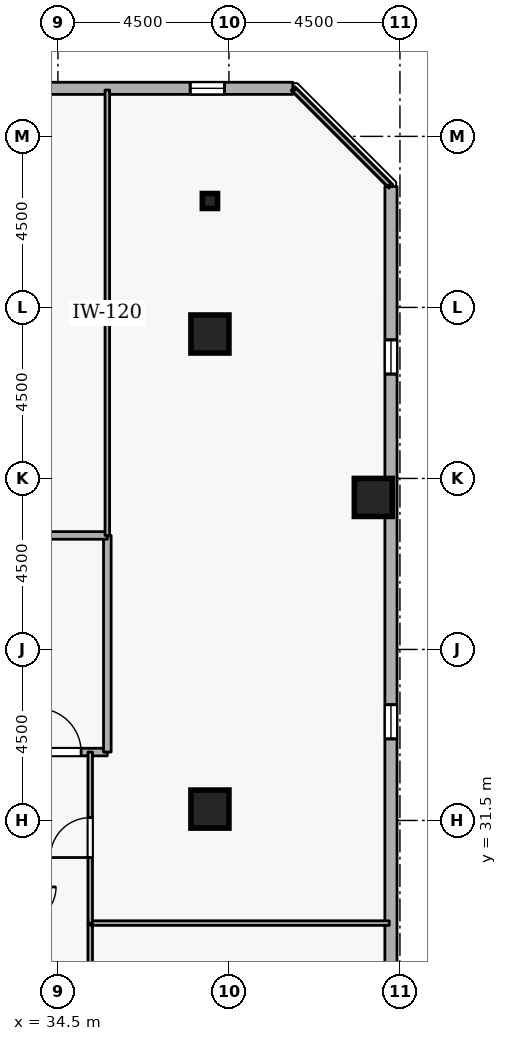
"""IFC4 building model, lengths in metres.
Left out: names, types, materials, properties, quantities, classifications, styles, units other than length and angle.
Written with IfcOpenShell. Run it as: python <this file> out.ifc"""

import sys

from ifc_helpers import new_model, si_unit, direction, frame, frame_2d, origin, origin_2d, place, context, subcontext, project, spatial, rectangle, i_section, extrude, element, fill, save


model = new_model("IFC4")
c1 = context("Model", 3, precision=1e-05, world=origin(), true_north=direction((0.0, 1.0)))
c2 = subcontext(c1, "Body", "Model", "MODEL_VIEW")
j1 = project(units=[si_unit("LENGTHUNIT", "METRE"), si_unit("PLANEANGLEUNIT", "RADIAN")], contexts=[c1])
p1 = place(None, origin())
s1 = spatial("IfcSite", under=j1, at=p1, CompositionType="ELEMENT")
p2 = place(p1, origin())
s2 = spatial("IfcBuilding", under=s1, at=p2, CompositionType="ELEMENT")
p3 = place(p2, frame((0.0, 0.0, 210.9)))
s3 = spatial("IfcBuildingStorey", under=s2, at=p3, CompositionType="ELEMENT", Elevation=210.9)
for number, where, z_axis, x_axis in (
    (1, (42.8, 40.0, 0.0), (0.0, 0.0, 1.0), (1.0, 0.0, 0.0)),
    (2, (38.5, 44.3, 0.0), (0.0, 0.0, 1.0), (1.0, 0.0, 0.0)),
    (3, (38.5, 31.8, 0.0), (0.0, 0.0, 1.0), (1.0, 0.0, 0.0)),
):
    element("IfcColumn", number, at=place(p3, frame(where, z_axis=z_axis, x_axis=x_axis)), inside=s3, PredefinedType="COLUMN", context=c2, shape_type="SweptSolid", body=[
        extrude(rectangle(XDim=1.0, YDim=1.0, at=origin_2d()), origin(), (0.0, 0.0, 1.0), 3.6),
    ])
p4 = place(p3, frame((38.5, 47.8, 0.0), z_axis=(0.0, 0.0, 1.0), x_axis=(1.0, 0.0, 0.0)))
e4 = element("IfcColumn", 4, at=p4, inside=s3, PredefinedType="COLUMN", context=c2, shape_type="SweptSolid", body=[
    extrude(i_section(OverallWidth=0.399, OverallDepth=0.394, WebThickness=0.023, FlangeThickness=0.037, FilletRadius=0.015, at=origin_2d()), origin(), (0.0, 0.0, 1.0), 3.6),
])
p5 = place(p3, frame((43.262, 12.646, 0.0), z_axis=(0.0, 0.0, 1.0), x_axis=(7.5574884e-05, 0.999999997144, 0.0)))
e5 = element("IfcWall", 5, at=p5, inside=s3, PredefinedType="STANDARD", context=c2, shape_type="SweptSolid", body=[
    extrude(rectangle(XDim=35.535, YDim=0.32, at=frame_2d((17.768, 0.0))), origin(), (0.0, 0.0, 1.0), 2.7),
])
p6 = place(p5, frame((6.6, 0.0, 0.72)))
e6 = element("IfcOpeningElement", 6, at=p6, cuts=e5, PredefinedType="OPENING", context=c2, shape_type="SweptSolid", body=[
    extrude(rectangle(XDim=0.9, YDim=1.75, at=frame_2d((0.45, 0.875))), frame((0.0, 0.17, 0.0), z_axis=(0.0, -1.0, 0.0), x_axis=(1.0, 0.0, 0.0)), (0.0, 0.0, 1.0), 0.34),
])
p7 = place(p5, frame((11.4, 0.0, 0.72)))
e7 = element("IfcOpeningElement", 7, at=p7, cuts=e5, PredefinedType="OPENING", context=c2, shape_type="SweptSolid", body=[
    extrude(rectangle(XDim=0.9, YDim=1.75, at=frame_2d((0.45, 0.875))), frame((0.0, 0.17, 0.0), z_axis=(0.0, -1.0, 0.0), x_axis=(1.0, 0.0, 0.0)), (0.0, 0.0, 1.0), 0.34),
])
p8 = place(p5, frame((21.0, 0.0, 0.72)))
e8 = element("IfcOpeningElement", 8, at=p8, cuts=e5, PredefinedType="OPENING", context=c2, shape_type="SweptSolid", body=[
    extrude(rectangle(XDim=0.9, YDim=1.75, at=frame_2d((0.45, 0.875))), frame((0.0, 0.17, 0.0), z_axis=(0.0, -1.0, 0.0), x_axis=(1.0, 0.0, 0.0)), (0.0, 0.0, 1.0), 0.34),
])
p9 = place(p5, frame((30.6, 0.0, 0.72)))
e9 = element("IfcOpeningElement", 9, at=p9, cuts=e5, PredefinedType="OPENING", context=c2, shape_type="SweptSolid", body=[
    extrude(rectangle(XDim=0.9, YDim=1.75, at=frame_2d((0.45, 0.875))), frame((0.0, 0.17, 0.0), z_axis=(0.0, -1.0, 0.0), x_axis=(1.0, 0.0, 0.0)), (0.0, 0.0, 1.0), 0.34),
])
p10 = place(p3, frame((40.681, 50.765, 0.0), z_axis=(0.0, 0.0, 1.0), x_axis=(-0.999999997144, -7.5574884e-05, 0.0)))
e10 = element("IfcWall", 10, at=p10, inside=s3, PredefinedType="STANDARD", context=c2, shape_type="SweptSolid", body=[
    extrude(rectangle(XDim=35.535, YDim=0.32, at=frame_2d((17.768, 0.0))), origin(), (0.0, 0.0, 1.0), 2.7),
])
p11 = place(p10, frame((1.8, 0.0, 0.72)))
e11 = element("IfcOpeningElement", 11, at=p11, cuts=e10, PredefinedType="OPENING", context=c2, shape_type="SweptSolid", body=[
    extrude(rectangle(XDim=0.9, YDim=1.75, at=frame_2d((0.45, 0.875))), frame((0.0, 0.17, 0.0), z_axis=(0.0, -1.0, 0.0), x_axis=(1.0, 0.0, 0.0)), (0.0, 0.0, 1.0), 0.34),
])
p12 = place(p10, frame((6.6, 0.0, 0.72)))
e12 = element("IfcOpeningElement", 12, at=p12, cuts=e10, PredefinedType="OPENING", context=c2, shape_type="SweptSolid", body=[
    extrude(rectangle(XDim=0.9, YDim=1.75, at=frame_2d((0.45, 0.875))), frame((0.0, 0.17, 0.0), z_axis=(0.0, -1.0, 0.0), x_axis=(1.0, 0.0, 0.0)), (0.0, 0.0, 1.0), 0.34),
])
p13 = place(p10, frame((11.4, 0.0, 0.72)))
e13 = element("IfcOpeningElement", 13, at=p13, cuts=e10, PredefinedType="OPENING", context=c2, shape_type="SweptSolid", body=[
    extrude(rectangle(XDim=0.9, YDim=1.75, at=frame_2d((0.45, 0.875))), frame((0.0, 0.17, 0.0), z_axis=(0.0, -1.0, 0.0), x_axis=(1.0, 0.0, 0.0)), (0.0, 0.0, 1.0), 0.34),
])
p14 = place(p10, frame((16.2, 0.0, 0.72)))
e14 = element("IfcOpeningElement", 14, at=p14, cuts=e10, PredefinedType="OPENING", context=c2, shape_type="SweptSolid", body=[
    extrude(rectangle(XDim=0.9, YDim=1.75, at=frame_2d((0.45, 0.875))), frame((0.0, 0.17, 0.0), z_axis=(0.0, -1.0, 0.0), x_axis=(1.0, 0.0, 0.0)), (0.0, 0.0, 1.0), 0.34),
])
p15 = place(p10, frame((21.0, 0.0, 0.72)))
e15 = element("IfcOpeningElement", 15, at=p15, cuts=e10, PredefinedType="OPENING", context=c2, shape_type="SweptSolid", body=[
    extrude(rectangle(XDim=0.9, YDim=1.75, at=frame_2d((0.45, 0.875))), frame((0.0, 0.17, 0.0), z_axis=(0.0, -1.0, 0.0), x_axis=(1.0, 0.0, 0.0)), (0.0, 0.0, 1.0), 0.34),
])
p16 = place(p10, frame((25.8, 0.0, 0.72)))
e16 = element("IfcOpeningElement", 16, at=p16, cuts=e10, PredefinedType="OPENING", context=c2, shape_type="SweptSolid", body=[
    extrude(rectangle(XDim=0.9, YDim=1.75, at=frame_2d((0.45, 0.875))), frame((0.0, 0.17, 0.0), z_axis=(0.0, -1.0, 0.0), x_axis=(1.0, 0.0, 0.0)), (0.0, 0.0, 1.0), 0.34),
])
p17 = place(p10, frame((30.6, 0.0, 0.72)))
e17 = element("IfcOpeningElement", 17, at=p17, cuts=e10, PredefinedType="OPENING", context=c2, shape_type="SweptSolid", body=[
    extrude(rectangle(XDim=0.9, YDim=1.75, at=frame_2d((0.45, 0.875))), frame((0.0, 0.17, 0.0), z_axis=(0.0, -1.0, 0.0), x_axis=(1.0, 0.0, 0.0)), (0.0, 0.0, 1.0), 0.34),
])
p18 = place(p3, frame((33.3, 33.3, 0.0), z_axis=(0.0, 0.0, 1.0), x_axis=(1.0, 0.0, 0.0)))
e18 = element("IfcWall", 18, at=p18, inside=s3, PredefinedType="STANDARD", context=c2, shape_type="SweptSolid", body=[
    extrude(rectangle(XDim=2.5, YDim=0.2, at=frame_2d((1.25, 0.0))), origin(), (0.0, 0.0, 1.0), 3.34),
])
p19 = place(p18, frame((0.66, 0.0, 0.0)))
e19 = element("IfcOpeningElement", 19, at=p19, cuts=e18, PredefinedType="OPENING", context=c2, shape_type="SweptSolid", body=[
    extrude(rectangle(XDim=1.15, YDim=2.1, at=frame_2d((0.575, 1.05))), frame((0.0, 0.11, 0.0), z_axis=(0.0, -1.0, 0.0), x_axis=(1.0, 0.0, 0.0)), (0.0, 0.0, 1.0), 0.22),
])
p20 = place(p3, frame((35.8, 33.3, 0.0), z_axis=(0.0, 0.0, 1.0), x_axis=(0.0, 1.0, 0.0)))
e20 = element("IfcWall", 20, at=p20, inside=s3, PredefinedType="STANDARD", context=c2, shape_type="SweptSolid", body=[
    extrude(rectangle(XDim=5.7, YDim=0.2, at=frame_2d((2.85, 0.0))), origin(), (0.0, 0.0, 1.0), 3.34),
])
p21 = place(p3, frame((35.8, 39.0, 0.0), z_axis=(0.0, 0.0, 1.0), x_axis=(-1.0, 0.0, 0.0)))
e21 = element("IfcWall", 21, at=p21, inside=s3, PredefinedType="STANDARD", context=c2, shape_type="SweptSolid", body=[
    extrude(rectangle(XDim=2.5, YDim=0.2, at=frame_2d((1.25, 0.0))), origin(), (0.0, 0.0, 1.0), 3.34),
])
p22 = place(p3, frame((35.35, 22.5, 0.0), z_axis=(0.0, 0.0, 1.0), x_axis=(0.0, 1.0, 0.0)))
e22 = element("IfcWall", 22, at=p22, inside=s3, PredefinedType="PARTITIONING", context=c2, shape_type="SweptSolid", body=[
    extrude(rectangle(XDim=6.3, YDim=0.12, at=frame_2d((3.15, 0.0))), origin(), (0.0, 0.0, 1.0), 3.34),
])
p23 = place(p22, frame((2.675, 0.0, 0.0)))
e23 = element("IfcOpeningElement", 23, at=p23, cuts=e22, PredefinedType="OPENING", context=c2, shape_type="SweptSolid", body=[
    extrude(rectangle(XDim=0.95, YDim=2.1, at=frame_2d((0.475, 1.05))), frame((0.0, 0.07, 0.0), z_axis=(0.0, -1.0, 0.0), x_axis=(1.0, 0.0, 0.0)), (0.0, 0.0, 1.0), 0.14),
])
p24 = place(p3, frame((35.35, 28.8, 0.0), z_axis=(0.0, 0.0, 1.0), x_axis=(1.0, 0.0, 0.0)))
e24 = element("IfcWall", 24, at=p24, inside=s3, PredefinedType="PARTITIONING", context=c2, shape_type="SweptSolid", body=[
    extrude(rectangle(XDim=7.87, YDim=0.12, at=frame_2d((3.935, 0.0))), origin(), (0.0, 0.0, 1.0), 3.34),
])
p25 = place(p3, frame((35.8, 39.0, 0.0), z_axis=(0.0, 0.0, 1.0), x_axis=(0.0, 1.0, 0.0)))
e25 = element("IfcWall", 25, at=p25, inside=s3, PredefinedType="PARTITIONING", context=c2, shape_type="SweptSolid", body=[
    extrude(rectangle(XDim=11.72, YDim=0.12, at=frame_2d((5.86, 0.0))), origin(), (0.0, 0.0, 1.0), 3.34),
])
p26 = place(p3, frame((40.725, 50.72, 0.0), z_axis=(0.0, 0.0, 1.0), x_axis=(0.707106781187, -0.707106781187, 0.0)))
e26 = element("IfcWall", 26, at=p26, inside=s3, PredefinedType="PARTITIONING", context=c2, shape_type="SweptSolid", body=[
    extrude(rectangle(XDim=3.528, YDim=0.12, at=frame_2d((1.764, 0.0))), origin(), (0.0, 0.0, 1.0), 3.34),
])
p27 = place(p3, frame((35.35, 28.8, 0.0), z_axis=(0.0, 0.0, 1.0), x_axis=(0.0, 1.0, 0.0)))
e27 = element("IfcWall", 27, at=p27, inside=s3, PredefinedType="PARTITIONING", context=c2, shape_type="SweptSolid", body=[
    extrude(rectangle(XDim=4.5, YDim=0.12, at=frame_2d((2.25, 0.0))), origin(), (0.0, 0.0, 1.0), 3.34),
])
p28 = place(p27, frame((1.725, 0.0, 0.0)))
e28 = element("IfcOpeningElement", 28, at=p28, cuts=e27, PredefinedType="OPENING", context=c2, shape_type="SweptSolid", body=[
    extrude(rectangle(XDim=1.05, YDim=2.1, at=frame_2d((0.525, 1.05))), frame((0.0, 0.07, 0.0), z_axis=(0.0, -1.0, 0.0), x_axis=(1.0, 0.0, 0.0)), (0.0, 0.0, 1.0), 0.14),
])
p29 = place(p8, origin())
e29 = element("IfcWindow", 29, at=p29, inside=s3, PartitioningType="SINGLE_PANEL", PredefinedType="WINDOW", context=c2, shape_type="SweptSolid", body=[
    extrude(rectangle(XDim=0.9, YDim=1.75, at=frame_2d((0.45, 0.875))), frame((0.0, 0.03, 0.0), z_axis=(0.0, -1.0, 0.0), x_axis=(1.0, 0.0, 0.0)), (0.0, 0.0, 1.0), 0.06),
])
fill(e8, e29)
p30 = place(p9, origin())
e30 = element("IfcWindow", 30, at=p30, inside=s3, PartitioningType="SINGLE_PANEL", PredefinedType="WINDOW", context=c2, shape_type="SweptSolid", body=[
    extrude(rectangle(XDim=0.9, YDim=1.75, at=frame_2d((0.45, 0.875))), frame((0.0, 0.03, 0.0), z_axis=(0.0, -1.0, 0.0), x_axis=(1.0, 0.0, 0.0)), (0.0, 0.0, 1.0), 0.06),
])
fill(e9, e30)
p31 = place(p11, origin())
e31 = element("IfcWindow", 31, at=p31, inside=s3, PartitioningType="SINGLE_PANEL", PredefinedType="WINDOW", context=c2, shape_type="SweptSolid", body=[
    extrude(rectangle(XDim=0.9, YDim=1.75, at=frame_2d((0.45, 0.875))), frame((0.0, 0.03, 0.0), z_axis=(0.0, -1.0, 0.0), x_axis=(1.0, 0.0, 0.0)), (0.0, 0.0, 1.0), 0.06),
])
fill(e11, e31)
p32 = place(p19, origin())
e32 = element("IfcDoor", 32, at=p32, inside=s3, OperationType="SINGLE_SWING_LEFT", PredefinedType="DOOR", context=c2, shape_type="SweptSolid", body=[
    extrude(rectangle(XDim=1.15, YDim=2.1, at=frame_2d((0.575, 1.05))), frame((0.0, 0.025, 0.0), z_axis=(0.0, -1.0, 0.0), x_axis=(1.0, 0.0, 0.0)), (0.0, 0.0, 1.0), 0.05),
])
fill(e19, e32)
p33 = place(p28, origin())
e33 = element("IfcDoor", 33, at=p33, inside=s3, OperationType="SINGLE_SWING_LEFT", PredefinedType="DOOR", context=c2, shape_type="SweptSolid", body=[
    extrude(rectangle(XDim=1.05, YDim=2.1, at=frame_2d((0.525, 1.05))), frame((0.0, 0.025, 0.0), z_axis=(0.0, -1.0, 0.0), x_axis=(1.0, 0.0, 0.0)), (0.0, 0.0, 1.0), 0.05),
])
fill(e28, e33)
save(model, sys.argv[1])
